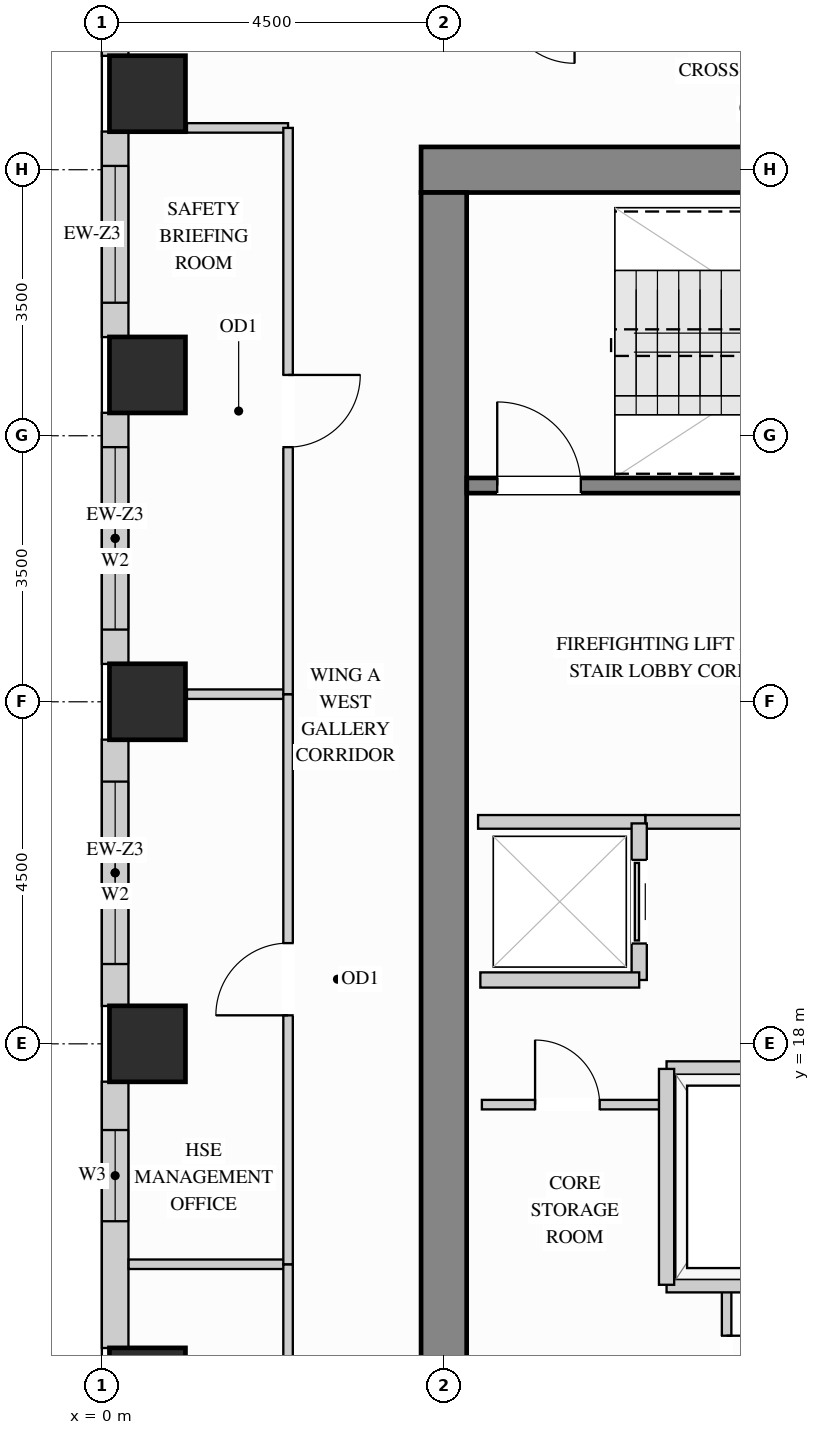
"""IFC4 building model, lengths in metres.
Left out: names, types, materials, properties, quantities, classifications, styles, units other than length and angle.
Written with IfcOpenShell. Run it as: python <this file> out.ifc"""

import sys

from ifc_helpers import new_model, si_unit, direction, frame, frame_2d, origin, origin_2d, place, context, subcontext, project, spatial, rectangle, extrude, source, transform, mapped, element, fill, save


model = new_model("IFC4")
c1 = context("Model", 3, precision=1e-05, world=origin(), true_north=direction((0.0, 1.0)))
c2 = subcontext(c1, "Body", "Model", "MODEL_VIEW")
j1 = project(units=[si_unit("LENGTHUNIT", "METRE"), si_unit("PLANEANGLEUNIT", "RADIAN")], contexts=[c1])
p1 = place(None, origin())
s1 = spatial("IfcSite", under=j1, at=p1, CompositionType="ELEMENT")
p2 = place(p1, origin())
s2 = spatial("IfcBuilding", under=s1, at=p2, CompositionType="ELEMENT")
p3 = place(p2, frame((0.0, 0.0, 182.7)))
s3 = spatial("IfcBuildingStorey", under=s2, at=p3, CompositionType="ELEMENT", Elevation=182.7)
m1 = source(origin(), c2, "Body", "SweptSolid", [
    extrude(rectangle(XDim=1.0, YDim=1.0, at=origin_2d()), origin(), (0.0, 0.0, 1.0), 3.4),
])
for number, where, z_axis, x_axis in (
    (1, (0.6, 13.5, 0.0), (0.0, 0.0, 1.0), (1.0, 0.0, 0.0)),
    (2, (0.6, 18.0, 0.0), (0.0, 0.0, 1.0), (1.0, 0.0, 0.0)),
    (3, (0.6, 22.5, 0.0), (0.0, 0.0, 1.0), (1.0, 0.0, 0.0)),
    (4, (0.6, 26.8, 0.0), (0.0, 0.0, 1.0), (1.0, 0.0, 0.0)),
    (5, (0.6, 30.5, 0.0), (0.0, 0.0, 1.0), (1.0, 0.0, 0.0)),
):
    element("IfcColumn", number, at=place(p3, frame(where, z_axis=z_axis, x_axis=x_axis)), inside=s3, PredefinedType="COLUMN", context=c2, shape_type="MappedRepresentation", body=[
        mapped(m1, transform((0.0, 0.0, 0.0), x_axis=(1.0, 0.0, 0.0), y_axis=(0.0, 1.0, 0.0), z_axis=(0.0, 0.0, 1.0))),
    ])
m2 = source(origin(), c2, "Body", "SweptSolid", [
    extrude(rectangle(XDim=10.6, YDim=0.6, at=frame_2d((5.3, 0.0))), origin(), (0.0, 0.0, 1.0), 3.4),
])
p4 = place(p3, frame((4.2, 29.5, 0.0), z_axis=(0.0, 0.0, 1.0), x_axis=(1.0, 0.0, 0.0)))
e6 = element("IfcWall", 6, at=p4, inside=s3, PredefinedType="SHEAR", context=c2, shape_type="MappedRepresentation", body=[
    mapped(m2, transform((0.0, 0.0, 0.0), x_axis=(1.0, 0.0, 0.0), y_axis=(0.0, 1.0, 0.0), z_axis=(0.0, 0.0, 1.0))),
])
m3 = source(origin(), c2, "Body", "SweptSolid", [
    extrude(rectangle(XDim=20.4, YDim=0.6, at=frame_2d((10.2, 0.0))), origin(), (0.0, 0.0, 1.0), 3.4),
])
p5 = place(p3, frame((4.5, 8.8, 0.0), z_axis=(0.0, 0.0, 1.0), x_axis=(0.0, 1.0, 0.0)))
e7 = element("IfcWall", 7, at=p5, inside=s3, PredefinedType="SHEAR", context=c2, shape_type="MappedRepresentation", body=[
    mapped(m3, transform((0.0, 0.0, 0.0), x_axis=(1.0, 0.0, 0.0), y_axis=(0.0, 1.0, 0.0), z_axis=(0.0, 0.0, 1.0))),
])
p6 = place(p3, frame((0.175, 34.502, 0.0), z_axis=(0.0, 0.0, 1.0), x_axis=(0.0, -1.0, 0.0)))
e8 = element("IfcWall", 8, at=p6, inside=s3, PredefinedType="SOLIDWALL", context=c2, shape_type="SweptSolid", body=[
    extrude(rectangle(XDim=3.504, YDim=0.35, at=frame_2d((1.752, 0.0))), origin(), (0.0, 0.0, 1.0), 2.612),
])
p7 = place(p6, frame((0.461, 0.0, 0.78)))
e9 = element("IfcOpeningElement", 9, at=p7, cuts=e8, PredefinedType="OPENING", context=c2, shape_type="SweptSolid", body=[
    extrude(rectangle(XDim=1.8, YDim=1.652, at=frame_2d((0.9, 0.826))), frame((0.0, 0.185, 0.0), z_axis=(0.0, -1.0, 0.0), x_axis=(1.0, 0.0, 0.0)), (0.0, 0.0, 1.0), 0.37),
])
p8 = place(p3, frame((0.175, 30.002, 0.0), z_axis=(0.0, 0.0, 1.0), x_axis=(0.0, -1.0, 0.0)))
e10 = element("IfcWall", 10, at=p8, inside=s3, PredefinedType="SOLIDWALL", context=c2, shape_type="SweptSolid", body=[
    extrude(rectangle(XDim=2.704, YDim=0.35, at=frame_2d((1.352, 0.0))), origin(), (0.0, 0.0, 1.0), 2.612),
])
p9 = place(p8, frame((0.452, 0.0, 0.78)))
e11 = element("IfcOpeningElement", 11, at=p9, cuts=e10, PredefinedType="OPENING", context=c2, shape_type="SweptSolid", body=[
    extrude(rectangle(XDim=1.8, YDim=1.652, at=frame_2d((0.9, 0.826))), frame((0.0, 0.185, 0.0), z_axis=(0.0, -1.0, 0.0), x_axis=(1.0, 0.0, 0.0)), (0.0, 0.0, 1.0), 0.37),
])
p10 = place(p3, frame((0.175, 26.302, 0.0), z_axis=(0.0, 0.0, 1.0), x_axis=(0.0, -1.0, 0.0)))
e12 = element("IfcWall", 12, at=p10, inside=s3, PredefinedType="SOLIDWALL", context=c2, shape_type="SweptSolid", body=[
    extrude(rectangle(XDim=3.304, YDim=0.35, at=frame_2d((1.652, 0.0))), origin(), (0.0, 0.0, 1.0), 2.612),
])
p11 = place(p10, frame((0.452, 0.0, 0.78)))
e13 = element("IfcOpeningElement", 13, at=p11, cuts=e12, PredefinedType="OPENING", context=c2, shape_type="SweptSolid", body=[
    extrude(rectangle(XDim=2.4, YDim=1.652, at=frame_2d((1.2, 0.826))), frame((0.0, 0.185, 0.0), z_axis=(0.0, -1.0, 0.0), x_axis=(1.0, 0.0, 0.0)), (0.0, 0.0, 1.0), 0.37),
])
p12 = place(p3, frame((0.175, 22.002, 0.0), z_axis=(0.0, 0.0, 1.0), x_axis=(0.0, -1.0, 0.0)))
e14 = element("IfcWall", 14, at=p12, inside=s3, PredefinedType="SOLIDWALL", context=c2, shape_type="SweptSolid", body=[
    extrude(rectangle(XDim=3.504, YDim=0.35, at=frame_2d((1.752, 0.0))), origin(), (0.0, 0.0, 1.0), 2.612),
])
p13 = place(p12, frame((0.552, 0.0, 0.78)))
e15 = element("IfcOpeningElement", 15, at=p13, cuts=e14, PredefinedType="OPENING", context=c2, shape_type="SweptSolid", body=[
    extrude(rectangle(XDim=2.4, YDim=1.652, at=frame_2d((1.2, 0.826))), frame((0.0, 0.185, 0.0), z_axis=(0.0, -1.0, 0.0), x_axis=(1.0, 0.0, 0.0)), (0.0, 0.0, 1.0), 0.37),
])
p14 = place(p3, frame((0.175, 17.502, 0.0), z_axis=(0.0, 0.0, 1.0), x_axis=(0.0, -1.0, 0.0)))
e16 = element("IfcWall", 16, at=p14, inside=s3, PredefinedType="SOLIDWALL", context=c2, shape_type="SweptSolid", body=[
    extrude(rectangle(XDim=3.504, YDim=0.35, at=frame_2d((1.752, 0.0))), origin(), (0.0, 0.0, 1.0), 2.612),
])
p15 = place(p14, frame((0.636, 0.0, 0.78)))
e17 = element("IfcOpeningElement", 17, at=p15, cuts=e16, PredefinedType="OPENING", context=c2, shape_type="SweptSolid", body=[
    extrude(rectangle(XDim=1.2, YDim=1.652, at=frame_2d((0.6, 0.826))), frame((0.0, 0.185, 0.0), z_axis=(0.0, -1.0, 0.0), x_axis=(1.0, 0.0, 0.0)), (0.0, 0.0, 1.0), 0.37),
])
p16 = place(p3, frame((7.15, 20.92, 0.0), z_axis=(0.0, 0.0, 1.0), x_axis=(1.0, 0.0, 0.0)))
e18 = element("IfcWall", 18, at=p16, inside=s3, PredefinedType="PARTITIONING", context=c2, shape_type="SweptSolid", body=[
    extrude(rectangle(XDim=4.68, YDim=0.18, at=frame_2d((2.34, 0.0))), origin(), (0.0, 0.0, 1.0), 3.385),
])
p17 = place(p16, frame((2.2, 0.0, 0.0)))
e19 = element("IfcOpeningElement", 19, at=p17, cuts=e18, PredefinedType="OPENING", context=c2, shape_type="SweptSolid", body=[
    extrude(rectangle(XDim=1.1, YDim=2.15, at=frame_2d((0.55, 1.075))), frame((0.0, 0.1, 0.0), z_axis=(0.0, -1.0, 0.0), x_axis=(1.0, 0.0, 0.0)), (0.0, 0.0, 1.0), 0.2),
])
m4 = source(origin(), c2, "Body", "SweptSolid", [
    extrude(rectangle(XDim=2.2, YDim=0.18, at=frame_2d((1.1, 0.0))), origin(), (0.0, 0.0, 1.0), 3.385),
])
p18 = place(p3, frame((4.95, 20.92, 0.0), z_axis=(0.0, 0.0, 1.0), x_axis=(1.0, 0.0, 0.0)))
e20 = element("IfcWall", 20, at=p18, inside=s3, PredefinedType="PARTITIONING", context=c2, shape_type="MappedRepresentation", body=[
    mapped(m4, transform((0.0, 0.0, 0.0), x_axis=(1.0, 0.0, 0.0), y_axis=(0.0, 1.0, 0.0), z_axis=(0.0, 0.0, 1.0))),
])
p19 = place(p3, frame((8.22, 12.75, 0.0), z_axis=(0.0, 0.0, 1.0), x_axis=(0.0, 1.0, 0.0)))
e21 = element("IfcWall", 21, at=p19, inside=s3, PredefinedType="PARTITIONING", context=c2, shape_type="SweptSolid", body=[
    extrude(rectangle(XDim=2.07, YDim=0.125, at=frame_2d((1.035, 0.0))), origin(), (0.0, 0.0, 1.0), 3.385),
])
p20 = place(p19, frame((0.56, 0.0, 0.0)))
e22 = element("IfcOpeningElement", 22, at=p20, cuts=e21, PredefinedType="OPENING", context=c2, shape_type="SweptSolid", body=[
    extrude(rectangle(XDim=0.85, YDim=2.1, at=frame_2d((0.425, 1.05))), frame((0.0, 0.073, 0.0), z_axis=(0.0, -1.0, 0.0), x_axis=(1.0, 0.0, 0.0)), (0.0, 0.0, 1.0), 0.145),
])
p21 = place(p3, frame((5.0, 17.2, 0.0), z_axis=(0.0, 0.0, 1.0), x_axis=(1.0, 0.0, 0.0)))
e23 = element("IfcWall", 23, at=p21, inside=s3, PredefinedType="PARTITIONING", context=c2, shape_type="SweptSolid", body=[
    extrude(rectangle(XDim=2.4, YDim=0.125, at=frame_2d((1.2, 0.0))), origin(), (0.0, 0.0, 1.0), 3.385),
])
p22 = place(p21, frame((0.7, 0.0, 0.0)))
e24 = element("IfcOpeningElement", 24, at=p22, cuts=e23, PredefinedType="OPENING", context=c2, shape_type="SweptSolid", body=[
    extrude(rectangle(XDim=0.85, YDim=2.1, at=frame_2d((0.425, 1.05))), frame((0.0, 0.073, 0.0), z_axis=(0.0, -1.0, 0.0), x_axis=(1.0, 0.0, 0.0)), (0.0, 0.0, 1.0), 0.145),
])
m5 = source(origin(), c2, "Body", "SweptSolid", [
    extrude(rectangle(XDim=1.33, YDim=0.125, at=frame_2d((0.665, 0.0))), origin(), (0.0, 0.0, 1.0), 3.385),
])
p23 = place(p3, frame((1.12, 30.05, 0.0), z_axis=(0.0, 0.0, 1.0), x_axis=(1.0, 0.0, 0.0)))
e25 = element("IfcWall", 25, at=p23, inside=s3, PredefinedType="PARTITIONING", context=c2, shape_type="MappedRepresentation", body=[
    mapped(m5, transform((0.0, 0.0, 0.0), x_axis=(1.0, 0.0, 0.0), y_axis=(0.0, 1.0, 0.0), z_axis=(0.0, 0.0, 1.0))),
])
m6 = source(origin(), c2, "Body", "SweptSolid", [
    extrude(rectangle(XDim=2.098, YDim=0.125, at=frame_2d((1.049, 0.0))), origin(), (0.0, 0.0, 1.0), 3.385),
])
p24 = place(p3, frame((0.352, 15.1, 0.0), z_axis=(0.0, 0.0, 1.0), x_axis=(1.0, 0.0, 0.0)))
e26 = element("IfcWall", 26, at=p24, inside=s3, PredefinedType="PARTITIONING", context=c2, shape_type="MappedRepresentation", body=[
    mapped(m6, transform((0.0, 0.0, 0.0), x_axis=(1.0, 0.0, 0.0), y_axis=(0.0, 1.0, 0.0), z_axis=(0.0, 0.0, 1.0))),
])
p25 = place(p3, frame((1.12, 22.6, 0.0), z_axis=(0.0, 0.0, 1.0), x_axis=(1.0, 0.0, 0.0)))
e27 = element("IfcWall", 27, at=p25, inside=s3, PredefinedType="PARTITIONING", context=c2, shape_type="MappedRepresentation", body=[
    mapped(m5, transform((0.0, 0.0, 0.0), x_axis=(1.0, 0.0, 0.0), y_axis=(0.0, 1.0, 0.0), z_axis=(0.0, 0.0, 1.0))),
])
p26 = place(p3, frame((2.45, 7.85, 0.0), z_axis=(0.0, 0.0, 1.0), x_axis=(0.0, 1.0, 0.0)))
e28 = element("IfcWall", 28, at=p26, inside=s3, PredefinedType="PARTITIONING", context=c2, shape_type="SweptSolid", body=[
    extrude(rectangle(XDim=7.25, YDim=0.125, at=frame_2d((3.625, 0.0))), origin(), (0.0, 0.0, 1.0), 3.385),
])
p27 = place(p26, frame((3.15, 0.0, 0.0)))
e29 = element("IfcOpeningElement", 29, at=p27, cuts=e28, PredefinedType="OPENING", context=c2, shape_type="SweptSolid", body=[
    extrude(rectangle(XDim=0.95, YDim=2.15, at=frame_2d((0.475, 1.075))), frame((0.0, 0.073, 0.0), z_axis=(0.0, -1.0, 0.0), x_axis=(1.0, 0.0, 0.0)), (0.0, 0.0, 1.0), 0.145),
])
p28 = place(p3, frame((2.45, 15.1, 0.0), z_axis=(0.0, 0.0, 1.0), x_axis=(0.0, 1.0, 0.0)))
e30 = element("IfcWall", 30, at=p28, inside=s3, PredefinedType="PARTITIONING", context=c2, shape_type="SweptSolid", body=[
    extrude(rectangle(XDim=7.5, YDim=0.125, at=frame_2d((3.75, 0.0))), origin(), (0.0, 0.0, 1.0), 3.385),
])
p29 = place(p28, frame((3.275, 0.0, 0.0)))
e31 = element("IfcOpeningElement", 31, at=p29, cuts=e30, PredefinedType="OPENING", context=c2, shape_type="SweptSolid", body=[
    extrude(rectangle(XDim=0.95, YDim=2.15, at=frame_2d((0.475, 1.075))), frame((0.0, 0.073, 0.0), z_axis=(0.0, -1.0, 0.0), x_axis=(1.0, 0.0, 0.0)), (0.0, 0.0, 1.0), 0.145),
])
p30 = place(p3, frame((2.45, 22.6, 0.0), z_axis=(0.0, 0.0, 1.0), x_axis=(0.0, 1.0, 0.0)))
e32 = element("IfcWall", 32, at=p30, inside=s3, PredefinedType="PARTITIONING", context=c2, shape_type="SweptSolid", body=[
    extrude(rectangle(XDim=7.45, YDim=0.125, at=frame_2d((3.725, 0.0))), origin(), (0.0, 0.0, 1.0), 3.385),
])
p31 = place(p30, frame((3.25, 0.0, 0.0)))
e33 = element("IfcOpeningElement", 33, at=p31, cuts=e32, PredefinedType="OPENING", context=c2, shape_type="SweptSolid", body=[
    extrude(rectangle(XDim=0.95, YDim=2.15, at=frame_2d((0.475, 1.075))), frame((0.0, 0.073, 0.0), z_axis=(0.0, -1.0, 0.0), x_axis=(1.0, 0.0, 0.0)), (0.0, 0.0, 1.0), 0.145),
])
p32 = place(p3, frame((7.07, 18.84, 0.0), z_axis=(0.0, 0.0, 1.0), x_axis=(0.0, 1.0, 0.0)))
e34 = element("IfcWall", 34, at=p32, inside=s3, PredefinedType="PARTITIONING", context=c2, shape_type="SweptSolid", body=[
    extrude(rectangle(XDim=2.06, YDim=0.2, at=frame_2d((1.03, 0.0))), origin(), (0.0, 0.0, 1.0), 3.385),
])
p33 = place(p32, frame((0.48, 0.0, 0.0)))
e35 = element("IfcOpeningElement", 35, at=p33, cuts=e34, PredefinedType="OPENING", context=c2, shape_type="SweptSolid", body=[
    extrude(rectangle(XDim=1.1, YDim=2.2, at=frame_2d((0.55, 1.1))), frame((0.0, 0.11, 0.0), z_axis=(0.0, -1.0, 0.0), x_axis=(1.0, 0.0, 0.0)), (0.0, 0.0, 1.0), 0.22),
])
m7 = source(origin(), c2, "Body", "SweptSolid", [
    extrude(rectangle(XDim=2.09, YDim=0.2, at=frame_2d((1.045, 0.0))), origin(), (0.0, 0.0, 1.0), 3.385),
])
p34 = place(p3, frame((4.98, 18.84, 0.0), z_axis=(0.0, 0.0, 1.0), x_axis=(1.0, 0.0, 0.0)))
e36 = element("IfcWall", 36, at=p34, inside=s3, PredefinedType="PARTITIONING", context=c2, shape_type="MappedRepresentation", body=[
    mapped(m7, transform((0.0, 0.0, 0.0), x_axis=(1.0, 0.0, 0.0), y_axis=(0.0, 1.0, 0.0), z_axis=(0.0, 0.0, 1.0))),
])
m8 = source(origin(), c2, "Body", "SweptSolid", [
    extrude(rectangle(XDim=2.04, YDim=0.2, at=frame_2d((1.02, 0.0))), origin(), (0.0, 0.0, 1.0), 3.385),
])
for number, where, z_axis, x_axis in (
    (37, (7.43, 17.67, 0.0), (0.0, 0.0, 1.0), (1.0, 0.0, 0.0)),
    (38, (7.43, 14.83, 0.0), (0.0, 0.0, 1.0), (1.0, 0.0, 0.0)),
):
    element("IfcWall", number, at=place(p3, frame(where, z_axis=z_axis, x_axis=x_axis)), inside=s3, PredefinedType="PARTITIONING", context=c2, shape_type="MappedRepresentation", body=[
        mapped(m8, transform((0.0, 0.0, 0.0), x_axis=(1.0, 0.0, 0.0), y_axis=(0.0, 1.0, 0.0), z_axis=(0.0, 0.0, 1.0))),
    ])
m9 = source(origin(), c2, "Body", "SweptSolid", [
    extrude(rectangle(XDim=2.84, YDim=0.2, at=frame_2d((1.42, 0.0))), origin(), (0.0, 0.0, 1.0), 3.385),
])
p35 = place(p3, frame((7.43, 14.83, 0.0), z_axis=(0.0, 0.0, 1.0), x_axis=(0.0, 1.0, 0.0)))
e39 = element("IfcWall", 39, at=p35, inside=s3, PredefinedType="PARTITIONING", context=c2, shape_type="MappedRepresentation", body=[
    mapped(m9, transform((0.0, 0.0, 0.0), x_axis=(1.0, 0.0, 0.0), y_axis=(0.0, 1.0, 0.0), z_axis=(0.0, 0.0, 1.0))),
])
p36 = place(p3, frame((4.802, 25.345, 0.0), z_axis=(0.0, 0.0, 1.0), x_axis=(1.0, 0.0, 0.0)))
e40 = element("IfcWall", 40, at=p36, inside=s3, PredefinedType="SHEAR", context=c2, shape_type="SweptSolid", body=[
    extrude(rectangle(XDim=7.603, YDim=0.2, at=frame_2d((3.802, 0.0))), origin(), (0.0, 0.0, 1.0), 3.4),
])
p37 = place(p36, frame((0.4, 0.0, 0.0)))
e41 = element("IfcOpeningElement", 41, at=p37, cuts=e40, PredefinedType="OPENING", context=c2, shape_type="SweptSolid", body=[
    extrude(rectangle(XDim=1.1, YDim=2.15, at=frame_2d((0.55, 1.075))), frame((0.0, 0.11, 0.0), z_axis=(0.0, -1.0, 0.0), x_axis=(1.0, 0.0, 0.0)), (0.0, 0.0, 1.0), 0.22),
])
m10 = source(origin(), c2, "Body", "SweptSolid", [
    extrude(rectangle(XDim=1.1, YDim=2.2, at=frame_2d((0.55, 1.1))), frame((0.0, 0.025, 0.0), z_axis=(0.0, -1.0, 0.0), x_axis=(1.0, 0.0, 0.0)), (0.0, 0.0, 1.0), 0.05),
])
p38 = place(p33, origin())
e42 = element("IfcDoor", 42, at=p38, inside=s3, OperationType="SLIDING_TO_LEFT", PredefinedType="DOOR", context=c2, shape_type="MappedRepresentation", body=[
    mapped(m10, transform((0.0, 0.0, 0.0), x_axis=(1.0, 0.0, 0.0), y_axis=(0.0, 1.0, 0.0), z_axis=(0.0, 0.0, 1.0))),
])
fill(e35, e42)
m11 = source(origin(), c2, "Body", "SweptSolid", [
    extrude(rectangle(XDim=0.95, YDim=2.15, at=frame_2d((0.475, 1.075))), frame((0.0, 0.025, 0.0), z_axis=(0.0, -1.0, 0.0), x_axis=(1.0, 0.0, 0.0)), (0.0, 0.0, 1.0), 0.05),
])
p39 = place(p29, origin())
e43 = element("IfcDoor", 43, at=p39, inside=s3, OperationType="SINGLE_SWING_LEFT", PredefinedType="DOOR", context=c2, shape_type="MappedRepresentation", body=[
    mapped(m11, transform((0.0, 0.0, 0.0), x_axis=(1.0, 0.0, 0.0), y_axis=(0.0, 1.0, 0.0), z_axis=(0.0, 0.0, 1.0))),
])
fill(e31, e43)
p40 = place(p31, origin())
e44 = element("IfcDoor", 44, at=p40, inside=s3, OperationType="SINGLE_SWING_RIGHT", PredefinedType="DOOR", context=c2, shape_type="MappedRepresentation", body=[
    mapped(m11, transform((0.0, 0.0, 0.0), x_axis=(1.0, 0.0, 0.0), y_axis=(0.0, 1.0, 0.0), z_axis=(0.0, 0.0, 1.0))),
])
fill(e33, e44)
m12 = source(origin(), c2, "Body", "SweptSolid", [
    extrude(rectangle(XDim=0.85, YDim=2.1, at=frame_2d((0.425, 1.05))), frame((0.0, 0.025, 0.0), z_axis=(0.0, -1.0, 0.0), x_axis=(1.0, 0.0, 0.0)), (0.0, 0.0, 1.0), 0.05),
])
p41 = place(p22, origin())
e45 = element("IfcDoor", 45, at=p41, inside=s3, OperationType="SINGLE_SWING_LEFT", PredefinedType="DOOR", context=c2, shape_type="MappedRepresentation", body=[
    mapped(m12, transform((0.0, 0.0, 0.0), x_axis=(1.0, 0.0, 0.0), y_axis=(0.0, 1.0, 0.0), z_axis=(0.0, 0.0, 1.0))),
])
fill(e24, e45)
p42 = place(p20, origin())
e46 = element("IfcDoor", 46, at=p42, inside=s3, OperationType="SINGLE_SWING_RIGHT", PredefinedType="DOOR", context=c2, shape_type="MappedRepresentation", body=[
    mapped(m12, transform((0.0, 0.0, 0.0), x_axis=(1.0, 0.0, 0.0), y_axis=(0.0, 1.0, 0.0), z_axis=(0.0, 0.0, 1.0))),
])
fill(e22, e46)
m13 = source(origin(), c2, "Body", "SweptSolid", [
    extrude(rectangle(XDim=1.1, YDim=2.15, at=frame_2d((0.55, 1.075))), frame((0.0, 0.025, 0.0), z_axis=(0.0, -1.0, 0.0), x_axis=(1.0, 0.0, 0.0)), (0.0, 0.0, 1.0), 0.05),
])
p43 = place(p37, origin())
e47 = element("IfcDoor", 47, at=p43, inside=s3, OperationType="SINGLE_SWING_LEFT", PredefinedType="DOOR", context=c2, shape_type="MappedRepresentation", body=[
    mapped(m13, transform((0.0, 0.0, 0.0), x_axis=(1.0, 0.0, 0.0), y_axis=(0.0, 1.0, 0.0), z_axis=(0.0, 0.0, 1.0))),
])
fill(e41, e47)
m14 = source(origin(), c2, "Body", "SweptSolid", [
    extrude(rectangle(XDim=1.8, YDim=1.652, at=frame_2d((0.9, 0.826))), frame((0.0, 0.03, 0.0), z_axis=(0.0, -1.0, 0.0), x_axis=(1.0, 0.0, 0.0)), (0.0, 0.0, 1.0), 0.06),
])
p44 = place(p9, origin())
e48 = element("IfcWindow", 48, at=p44, inside=s3, PartitioningType="SINGLE_PANEL", PredefinedType="WINDOW", context=c2, shape_type="MappedRepresentation", body=[
    mapped(m14, transform((0.0, 0.0, 0.0), x_axis=(1.0, 0.0, 0.0), y_axis=(0.0, 1.0, 0.0), z_axis=(0.0, 0.0, 1.0))),
])
fill(e11, e48)
m15 = source(origin(), c2, "Body", "SweptSolid", [
    extrude(rectangle(XDim=2.4, YDim=1.652, at=frame_2d((1.2, 0.826))), frame((0.0, 0.03, 0.0), z_axis=(0.0, -1.0, 0.0), x_axis=(1.0, 0.0, 0.0)), (0.0, 0.0, 1.0), 0.06),
])
p45 = place(p11, origin())
e49 = element("IfcWindow", 49, at=p45, inside=s3, PartitioningType="SINGLE_PANEL", PredefinedType="WINDOW", context=c2, shape_type="MappedRepresentation", body=[
    mapped(m15, transform((0.0, 0.0, 0.0), x_axis=(1.0, 0.0, 0.0), y_axis=(0.0, 1.0, 0.0), z_axis=(0.0, 0.0, 1.0))),
])
fill(e13, e49)
p46 = place(p13, origin())
e50 = element("IfcWindow", 50, at=p46, inside=s3, PartitioningType="SINGLE_PANEL", PredefinedType="WINDOW", context=c2, shape_type="MappedRepresentation", body=[
    mapped(m15, transform((0.0, 0.0, 0.0), x_axis=(1.0, 0.0, 0.0), y_axis=(0.0, 1.0, 0.0), z_axis=(0.0, 0.0, 1.0))),
])
fill(e15, e50)
m16 = source(origin(), c2, "Body", "SweptSolid", [
    extrude(rectangle(XDim=1.2, YDim=1.652, at=frame_2d((0.6, 0.826))), frame((0.0, 0.03, 0.0), z_axis=(0.0, -1.0, 0.0), x_axis=(1.0, 0.0, 0.0)), (0.0, 0.0, 1.0), 0.06),
])
p47 = place(p15, origin())
e51 = element("IfcWindow", 51, at=p47, inside=s3, PartitioningType="SINGLE_PANEL", PredefinedType="WINDOW", context=c2, shape_type="MappedRepresentation", body=[
    mapped(m16, transform((0.0, 0.0, 0.0), x_axis=(1.0, 0.0, 0.0), y_axis=(0.0, 1.0, 0.0), z_axis=(0.0, 0.0, 1.0))),
])
fill(e17, e51)
save(model, sys.argv[1])
